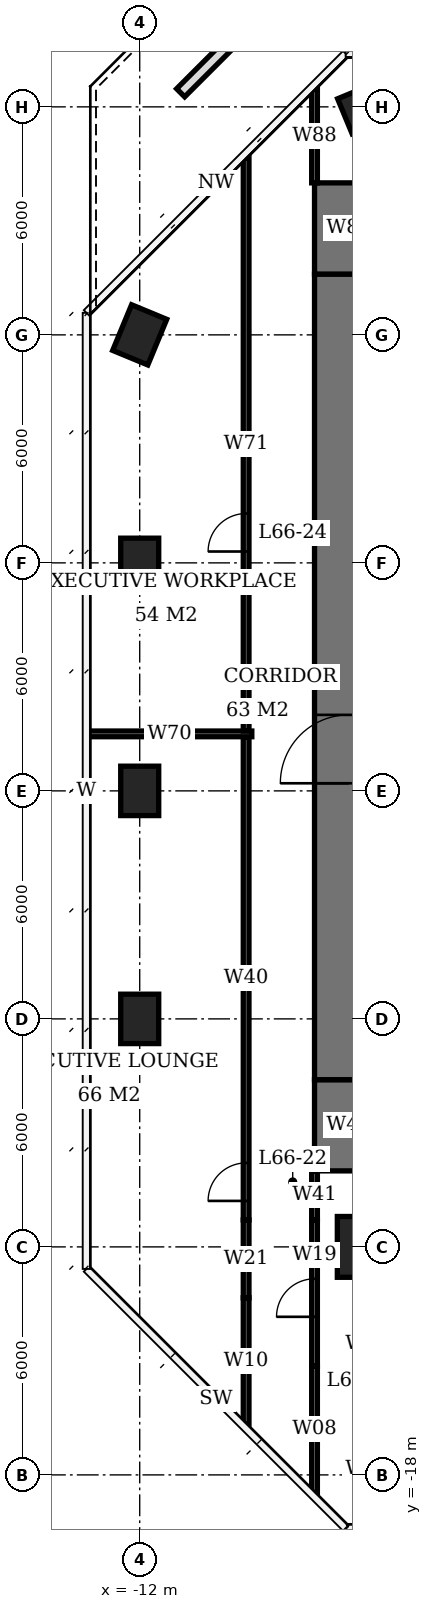
"""IFC4 building model, lengths in metres.
Left out: names, types, materials, properties, quantities, classifications, styles, units other than length and angle.
Written with IfcOpenShell. Run it as: python <this file> out.ifc"""

import sys

from ifc_helpers import new_model, si_unit, direction, frame, frame_2d, origin, origin_2d, place, context, subcontext, project, spatial, rectangle, extrude, element, fill, save


model = new_model("IFC4")
c1 = context("Model", 3, precision=1e-05, world=origin(), true_north=direction((0.0, 1.0)))
c2 = subcontext(c1, "Body", "Model", "MODEL_VIEW")
j1 = project(units=[si_unit("LENGTHUNIT", "METRE"), si_unit("PLANEANGLEUNIT", "RADIAN")], contexts=[c1])
p1 = place(None, origin())
s1 = spatial("IfcSite", under=j1, at=p1, CompositionType="ELEMENT")
p2 = place(p1, origin())
s2 = spatial("IfcBuilding", under=s1, at=p2, CompositionType="ELEMENT")
p3 = place(p2, frame((0.0, 0.0, 268.4)))
s3 = spatial("IfcBuildingStorey", under=s2, at=p3, CompositionType="ELEMENT", Elevation=268.4)
for number, where, z_axis, x_axis in (
    (1, (-12.0, -6.0, 0.0), (0.0, 0.0, 1.0), (0.0, 1.0, 0.0)),
    (2, (-12.0, 0.0, 0.0), (0.0, 0.0, 1.0), (0.0, 1.0, 0.0)),
    (3, (-12.0, 6.0, 0.0), (0.0, 0.0, 1.0), (0.0, 1.0, 0.0)),
    (4, (-12.0, 12.0, 0.0), (0.0, 0.0, 1.0), (0.383, 0.924, 0.0)),
):
    element("IfcColumn", number, at=place(p3, frame(where, z_axis=z_axis, x_axis=x_axis)), inside=s3, PredefinedType="COLUMN", context=c2, shape_type="SweptSolid", body=[
        extrude(rectangle(XDim=1.3, YDim=1.0, at=origin_2d()), origin(), (0.0, 0.0, 1.0), 3.9),
    ])
p4 = place(p3, frame((-6.0, -12.0, 0.0), z_axis=(0.0, 0.0, 1.0), x_axis=(1.0, 0.0, 0.0)))
e5 = element("IfcColumn", 5, at=p4, inside=s3, PredefinedType="COLUMN", context=c2, shape_type="SweptSolid", body=[
    extrude(rectangle(XDim=1.6, YDim=1.6, at=origin_2d()), origin(), (0.0, 0.0, 1.0), 3.9),
])
p5 = place(p3, frame((-6.0, 18.0, 0.0), z_axis=(0.0, 0.0, 1.0), x_axis=(0.923879532511, 0.382683432365, 0.0)))
e6 = element("IfcColumn", 6, at=p5, inside=s3, PredefinedType="COLUMN", context=c2, shape_type="SweptSolid", body=[
    extrude(rectangle(XDim=1.3, YDim=1.0, at=origin_2d()), origin(), (0.0, 0.0, 1.0), 3.9),
])
p6 = place(p3, frame((-6.5, -7.6, 0.0), z_axis=(0.0, 0.0, 1.0), x_axis=(0.0, 1.0, 0.0)))
e7 = element("IfcWall", 7, at=p6, inside=s3, PredefinedType="SHEAR", context=c2, shape_type="SweptSolid", body=[
    extrude(rectangle(XDim=21.2, YDim=1.8, at=frame_2d((10.6, 0.0))), origin(), (0.0, 0.0, 1.0), 3.9),
])
p7 = place(p6, frame((7.8, 0.0, 0.0)))
e8 = element("IfcOpeningElement", 8, at=p7, cuts=e7, PredefinedType="OPENING", context=c2, shape_type="SweptSolid", body=[
    extrude(rectangle(XDim=1.8, YDim=2.4, at=frame_2d((0.9, 1.2))), frame((0.0, 0.91, 0.0), z_axis=(0.0, -1.0, 0.0), x_axis=(1.0, 0.0, 0.0)), (0.0, 0.0, 1.0), 1.82),
])
for number, where, z_axis, x_axis in (
    (9, (-6.5, -10.0, 0.0), (0.0, 0.0, 1.0), (0.0, 1.0, 0.0)),
    (10, (-6.5, 13.6, 0.0), (0.0, 0.0, 1.0), (0.0, 1.0, 0.0)),
):
    element("IfcWall", number, at=place(p3, frame(where, z_axis=z_axis, x_axis=x_axis)), inside=s3, PredefinedType="SHEAR", context=c2, shape_type="SweptSolid", body=[
        extrude(rectangle(XDim=2.4, YDim=1.8, at=frame_2d((1.2, 0.0))), origin(), (0.0, 0.0, 1.0), 3.9),
    ])
p8 = place(p3, frame((-10.923, 18.37, 0.0), z_axis=(0.0, 0.0, 1.0), x_axis=(0.707106781187, 0.707106781187, 0.0)))
e11 = element("IfcWall", 11, at=p8, inside=s3, PredefinedType="USERDEFINED", context=c2, shape_type="SweptSolid", body=[
    extrude(rectangle(XDim=6.438, YDim=0.3, at=frame_2d((3.219, 0.0))), origin(), (0.0, 0.0, 1.0), 0.6),
])
p9 = place(p3, frame((-13.375, 1.5, 0.0), z_axis=(0.0, 0.0, 1.0), x_axis=(1.0, 0.0, 0.0)))
e12 = element("IfcWall", 12, at=p9, inside=s3, PredefinedType="PARTITIONING", context=c2, shape_type="SweptSolid", body=[
    extrude(rectangle(XDim=4.325, YDim=0.15, at=frame_2d((2.163, 0.0))), origin(), (0.0, 0.0, 1.0), 3.65),
])
p10 = place(p3, frame((-9.2, -16.664, 0.0), z_axis=(0.0, 0.0, 1.0), x_axis=(0.0, 1.0, 0.0)))
e13 = element("IfcWall", 13, at=p10, inside=s3, PredefinedType="PARTITIONING", context=c2, shape_type="SweptSolid", body=[
    extrude(rectangle(XDim=3.324, YDim=0.15, at=frame_2d((1.662, 0.0))), origin(), (0.0, 0.0, 1.0), 3.65),
])
p11 = place(p3, frame((-9.2, -13.34, 0.0), z_axis=(0.0, 0.0, 1.0), x_axis=(0.0, 1.0, 0.0)))
e14 = element("IfcWall", 14, at=p11, inside=s3, PredefinedType="PARTITIONING", context=c2, shape_type="SweptSolid", body=[
    extrude(rectangle(XDim=2.05, YDim=0.15, at=frame_2d((1.025, 0.0))), origin(), (0.0, 0.0, 1.0), 2.65),
])
p12 = place(p3, frame((-9.2, -11.29, 0.0), z_axis=(0.0, 0.0, 1.0), x_axis=(0.0, 1.0, 0.0)))
e15 = element("IfcWall", 15, at=p12, inside=s3, PredefinedType="PARTITIONING", context=c2, shape_type="SweptSolid", body=[
    extrude(rectangle(XDim=12.715, YDim=0.15, at=frame_2d((6.357, 0.0))), origin(), (0.0, 0.0, 1.0), 3.65),
])
p13 = place(p12, frame((0.5, 0.0, 0.0)))
e16 = element("IfcOpeningElement", 16, at=p13, cuts=e15, PredefinedType="OPENING", context=c2, shape_type="SweptSolid", body=[
    extrude(rectangle(XDim=1.0, YDim=2.4, at=frame_2d((0.5, 1.2))), frame((0.0, 0.085, 0.0), z_axis=(0.0, -1.0, 0.0), x_axis=(1.0, 0.0, 0.0)), (0.0, 0.0, 1.0), 0.17),
])
p14 = place(p3, frame((-9.2, 1.575, 0.0), z_axis=(0.0, 0.0, 1.0), x_axis=(0.0, 1.0, 0.0)))
e17 = element("IfcWall", 17, at=p14, inside=s3, PredefinedType="PARTITIONING", context=c2, shape_type="SweptSolid", body=[
    extrude(rectangle(XDim=15.089, YDim=0.15, at=frame_2d((7.544, 0.0))), origin(), (0.0, 0.0, 1.0), 3.65),
])
p15 = place(p14, frame((4.724, 0.0, 0.0)))
e18 = element("IfcOpeningElement", 18, at=p15, cuts=e17, PredefinedType="OPENING", context=c2, shape_type="SweptSolid", body=[
    extrude(rectangle(XDim=1.0, YDim=2.4, at=frame_2d((0.5, 1.2))), frame((0.0, 0.085, 0.0), z_axis=(0.0, -1.0, 0.0), x_axis=(1.0, 0.0, 0.0)), (0.0, 0.0, 1.0), 0.17),
])
p16 = place(p3, frame((-7.4, -18.464, 0.0), z_axis=(0.0, 0.0, 1.0), x_axis=(0.0, 1.0, 0.0)))
e19 = element("IfcWall", 19, at=p16, inside=s3, PredefinedType="PARTITIONING", context=c2, shape_type="SweptSolid", body=[
    extrude(rectangle(XDim=3.324, YDim=0.15, at=frame_2d((1.662, 0.0))), origin(), (0.0, 0.0, 1.0), 3.65),
])
p17 = place(p3, frame((-7.4, -15.14, 0.0), z_axis=(0.0, 0.0, 1.0), x_axis=(0.0, 1.0, 0.0)))
e20 = element("IfcWall", 20, at=p17, inside=s3, PredefinedType="PARTITIONING", context=c2, shape_type="SweptSolid", body=[
    extrude(rectangle(XDim=3.85, YDim=0.15, at=frame_2d((1.925, 0.0))), origin(), (0.0, 0.0, 1.0), 2.65),
])
p18 = place(p17, frame((1.3, 0.0, 0.0)))
e21 = element("IfcOpeningElement", 21, at=p18, cuts=e20, PredefinedType="OPENING", context=c2, shape_type="SweptSolid", body=[
    extrude(rectangle(XDim=1.0, YDim=2.1, at=frame_2d((0.5, 1.05))), frame((0.0, 0.085, 0.0), z_axis=(0.0, -1.0, 0.0), x_axis=(1.0, 0.0, 0.0)), (0.0, 0.0, 1.0), 0.17),
])
p19 = place(p3, frame((-7.4, -11.29, 0.0), z_axis=(0.0, 0.0, 1.0), x_axis=(0.0, 1.0, 0.0)))
e22 = element("IfcWall", 22, at=p19, inside=s3, PredefinedType="PARTITIONING", context=c2, shape_type="SweptSolid", body=[
    extrude(rectangle(XDim=1.29, YDim=0.15, at=frame_2d((0.645, 0.0))), origin(), (0.0, 0.0, 1.0), 3.65),
])
p20 = place(p3, frame((-7.4, 16.0, 0.0), z_axis=(0.0, 0.0, 1.0), x_axis=(0.0, 1.0, 0.0)))
e23 = element("IfcWall", 23, at=p20, inside=s3, PredefinedType="PARTITIONING", context=c2, shape_type="SweptSolid", body=[
    extrude(rectangle(XDim=2.464, YDim=0.15, at=frame_2d((1.232, 0.0))), origin(), (0.0, 0.0, 1.0), 3.65),
])
p21 = place(p7, origin())
e24 = element("IfcDoor", 24, at=p21, inside=s3, OperationType="DOUBLE_DOOR_SINGLE_SWING", PredefinedType="DOOR", context=c2, shape_type="SweptSolid", body=[
    extrude(rectangle(XDim=1.8, YDim=2.4, at=frame_2d((0.9, 1.2))), frame((0.0, 0.025, 0.0), z_axis=(0.0, -1.0, 0.0), x_axis=(1.0, 0.0, 0.0)), (0.0, 0.0, 1.0), 0.05),
])
fill(e8, e24)
p22 = place(p13, origin())
e25 = element("IfcDoor", 25, at=p22, inside=s3, OperationType="SINGLE_SWING_LEFT", PredefinedType="DOOR", context=c2, shape_type="SweptSolid", body=[
    extrude(rectangle(XDim=1.0, YDim=2.4, at=frame_2d((0.5, 1.2))), frame((0.0, 0.025, 0.0), z_axis=(0.0, -1.0, 0.0), x_axis=(1.0, 0.0, 0.0)), (0.0, 0.0, 1.0), 0.05),
])
fill(e16, e25)
p23 = place(p15, origin())
e26 = element("IfcDoor", 26, at=p23, inside=s3, OperationType="SINGLE_SWING_LEFT", PredefinedType="DOOR", context=c2, shape_type="SweptSolid", body=[
    extrude(rectangle(XDim=1.0, YDim=2.4, at=frame_2d((0.5, 1.2))), frame((0.0, 0.025, 0.0), z_axis=(0.0, -1.0, 0.0), x_axis=(1.0, 0.0, 0.0)), (0.0, 0.0, 1.0), 0.05),
])
fill(e18, e26)
p24 = place(p18, origin())
e27 = element("IfcDoor", 27, at=p24, inside=s3, OperationType="SINGLE_SWING_LEFT", PredefinedType="DOOR", context=c2, shape_type="SweptSolid", body=[
    extrude(rectangle(XDim=1.0, YDim=2.1, at=frame_2d((0.5, 1.05))), frame((0.0, 0.025, 0.0), z_axis=(0.0, -1.0, 0.0), x_axis=(1.0, 0.0, 0.0)), (0.0, 0.0, 1.0), 0.05),
])
fill(e21, e27)
save(model, sys.argv[1])
